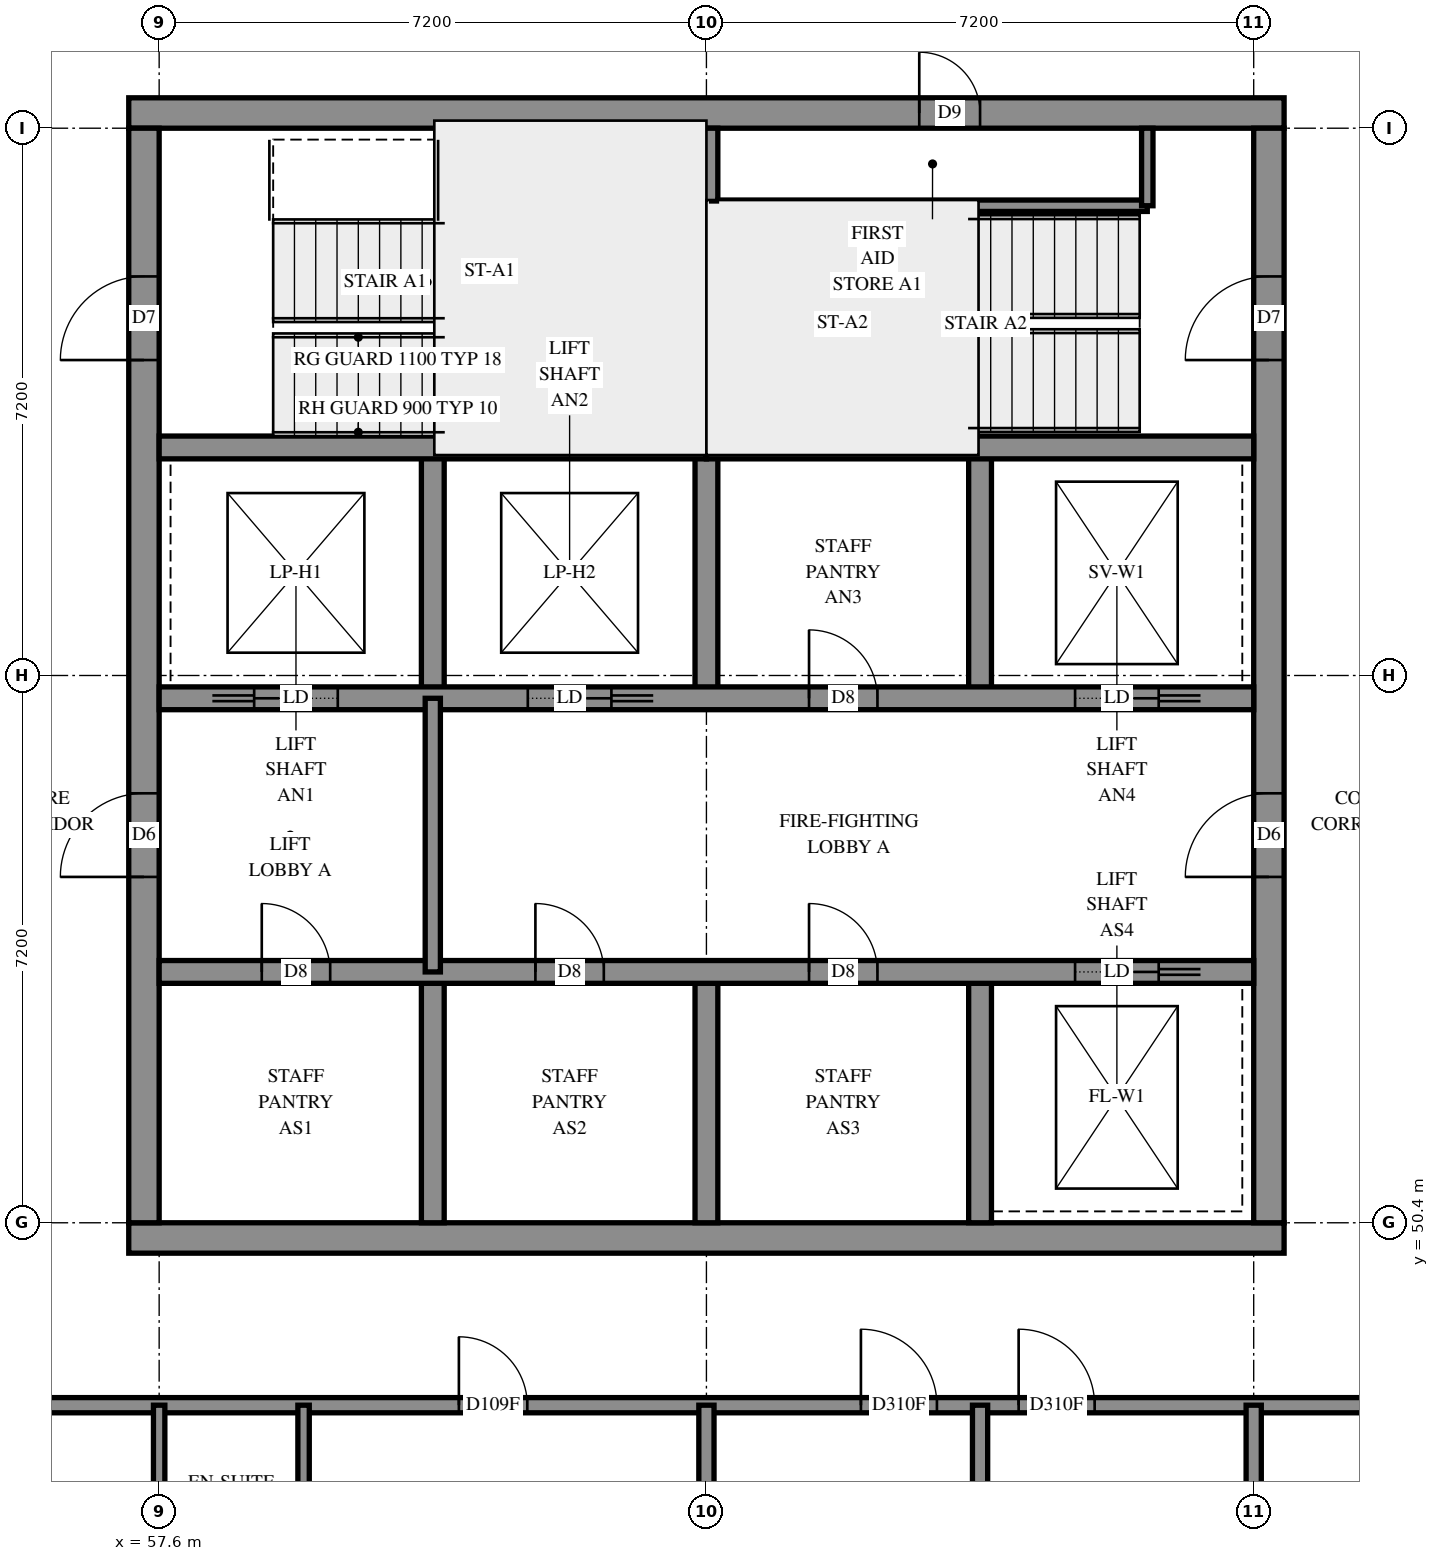
"""IFC4 building model, lengths in metres.
Left out: names, types, materials, properties, quantities, classifications, styles, units other than length and angle.
Written with IfcOpenShell. Run it as: python <this file> out.ifc"""

import sys

from ifc_helpers import new_model, si_unit, direction, frame, frame_2d, origin, place, context, subcontext, project, spatial, rectangle, extrude, element, fill, save


model = new_model("IFC4")
c1 = context("Model", 3, precision=1e-05, world=origin(), true_north=direction((0.0, 1.0)))
c2 = subcontext(c1, "Body", "Model", "MODEL_VIEW")
j1 = project(units=[si_unit("LENGTHUNIT", "METRE"), si_unit("PLANEANGLEUNIT", "RADIAN")], contexts=[c1])
p1 = place(None, origin())
s1 = spatial("IfcSite", under=j1, at=p1, CompositionType="ELEMENT")
p2 = place(p1, origin())
s2 = spatial("IfcBuilding", under=s1, at=p2, CompositionType="ELEMENT")
p3 = place(p2, frame((0.0, 0.0, 257.4)))
s3 = spatial("IfcBuildingStorey", under=s2, at=p3, CompositionType="ELEMENT", Elevation=257.4)
p4 = place(p3, frame((57.2, 50.2, -0.3), z_axis=(0.0, 0.0, 1.0), x_axis=(1.0, 0.0, 0.0)))
e1 = element("IfcWall", 1, at=p4, inside=s3, PredefinedType="SHEAR", context=c2, shape_type="SweptSolid", body=[
    extrude(rectangle(XDim=15.2, YDim=0.4, at=frame_2d((7.6, 0.0))), origin(), (0.0, 0.0, 1.0), 2.7),
])
p5 = place(p3, frame((57.2, 65.0, -0.3), z_axis=(0.0, 0.0, 1.0), x_axis=(1.0, 0.0, 0.0)))
e2 = element("IfcWall", 2, at=p5, inside=s3, PredefinedType="SHEAR", context=c2, shape_type="SweptSolid", body=[
    extrude(rectangle(XDim=15.2, YDim=0.4, at=frame_2d((7.6, 0.0))), origin(), (0.0, 0.0, 1.0), 2.7),
])
p6 = place(p5, frame((10.4, 0.0, 0.3)))
e3 = element("IfcOpeningElement", 3, at=p6, cuts=e2, PredefinedType="OPENING", context=c2, shape_type="SweptSolid", body=[
    extrude(rectangle(XDim=0.8, YDim=2.1, at=frame_2d((0.4, 1.05))), frame((0.0, 0.21, 0.0), z_axis=(0.0, -1.0, 0.0), x_axis=(1.0, 0.0, 0.0)), (0.0, 0.0, 1.0), 0.42),
])
p7 = place(p3, frame((57.4, 50.4, -0.3), z_axis=(0.0, 0.0, 1.0), x_axis=(0.0, 1.0, 0.0)))
e4 = element("IfcWall", 4, at=p7, inside=s3, PredefinedType="SHEAR", context=c2, shape_type="SweptSolid", body=[
    extrude(rectangle(XDim=14.4, YDim=0.4, at=frame_2d((7.2, 0.0))), origin(), (0.0, 0.0, 1.0), 2.7),
])
p8 = place(p7, frame((4.55, 0.0, 0.3)))
e5 = element("IfcOpeningElement", 5, at=p8, cuts=e4, PredefinedType="OPENING", context=c2, shape_type="SweptSolid", body=[
    extrude(rectangle(XDim=1.1, YDim=2.1, at=frame_2d((0.55, 1.05))), frame((0.0, 0.21, 0.0), z_axis=(0.0, -1.0, 0.0), x_axis=(1.0, 0.0, 0.0)), (0.0, 0.0, 1.0), 0.42),
])
p9 = place(p7, frame((11.35, 0.0, 0.3)))
e6 = element("IfcOpeningElement", 6, at=p9, cuts=e4, PredefinedType="OPENING", context=c2, shape_type="SweptSolid", body=[
    extrude(rectangle(XDim=1.1, YDim=2.1, at=frame_2d((0.55, 1.05))), frame((0.0, 0.21, 0.0), z_axis=(0.0, -1.0, 0.0), x_axis=(1.0, 0.0, 0.0)), (0.0, 0.0, 1.0), 0.42),
])
p10 = place(p3, frame((72.2, 50.4, -0.3), z_axis=(0.0, 0.0, 1.0), x_axis=(0.0, 1.0, 0.0)))
e7 = element("IfcWall", 7, at=p10, inside=s3, PredefinedType="SHEAR", context=c2, shape_type="SweptSolid", body=[
    extrude(rectangle(XDim=14.4, YDim=0.4, at=frame_2d((7.2, 0.0))), origin(), (0.0, 0.0, 1.0), 2.7),
])
p11 = place(p10, frame((4.55, 0.0, 0.3)))
e8 = element("IfcOpeningElement", 8, at=p11, cuts=e7, PredefinedType="OPENING", context=c2, shape_type="SweptSolid", body=[
    extrude(rectangle(XDim=1.1, YDim=2.1, at=frame_2d((0.55, 1.05))), frame((0.0, 0.21, 0.0), z_axis=(0.0, -1.0, 0.0), x_axis=(1.0, 0.0, 0.0)), (0.0, 0.0, 1.0), 0.42),
])
p12 = place(p10, frame((11.35, 0.0, 0.3)))
e9 = element("IfcOpeningElement", 9, at=p12, cuts=e7, PredefinedType="OPENING", context=c2, shape_type="SweptSolid", body=[
    extrude(rectangle(XDim=1.1, YDim=2.1, at=frame_2d((0.55, 1.05))), frame((0.0, 0.21, 0.0), z_axis=(0.0, -1.0, 0.0), x_axis=(1.0, 0.0, 0.0)), (0.0, 0.0, 1.0), 0.42),
])
for number, where, z_axis, x_axis in (
    (10, (61.2, 50.4, 0.0), (0.0, 0.0, 1.0), (0.0, 1.0, 0.0)),
    (11, (61.2, 57.3, 0.0), (0.0, 0.0, 1.0), (0.0, 1.0, 0.0)),
    (12, (64.8, 50.4, 0.0), (0.0, 0.0, 1.0), (0.0, 1.0, 0.0)),
    (13, (64.8, 57.3, 0.0), (0.0, 0.0, 1.0), (0.0, 1.0, 0.0)),
    (14, (68.4, 50.4, 0.0), (0.0, 0.0, 1.0), (0.0, 1.0, 0.0)),
    (15, (68.4, 57.3, 0.0), (0.0, 0.0, 1.0), (0.0, 1.0, 0.0)),
):
    element("IfcWall", number, at=place(p3, frame(where, z_axis=z_axis, x_axis=x_axis)), inside=s3, PredefinedType="SOLIDWALL", context=c2, shape_type="SweptSolid", body=[
        extrude(rectangle(XDim=3.3, YDim=0.3, at=frame_2d((1.65, 0.0))), origin(), (0.0, 0.0, 1.0), 3.1),
    ])
p13 = place(p3, frame((57.6, 53.7, 0.0), z_axis=(0.0, 0.0, 1.0), x_axis=(1.0, 0.0, 0.0)))
e16 = element("IfcWall", 16, at=p13, inside=s3, PredefinedType="SOLIDWALL", context=c2, shape_type="SweptSolid", body=[
    extrude(rectangle(XDim=14.4, YDim=0.3, at=frame_2d((7.2, 0.0))), origin(), (0.0, 0.0, 1.0), 3.1),
])
p14 = place(p13, frame((1.35, 0.0, 0.0)))
e17 = element("IfcOpeningElement", 17, at=p14, cuts=e16, PredefinedType="OPENING", context=c2, shape_type="SweptSolid", body=[
    extrude(rectangle(XDim=0.9, YDim=2.1, at=frame_2d((0.45, 1.05))), frame((0.0, 0.16, 0.0), z_axis=(0.0, -1.0, 0.0), x_axis=(1.0, 0.0, 0.0)), (0.0, 0.0, 1.0), 0.32),
])
p15 = place(p13, frame((4.95, 0.0, 0.0)))
e18 = element("IfcOpeningElement", 18, at=p15, cuts=e16, PredefinedType="OPENING", context=c2, shape_type="SweptSolid", body=[
    extrude(rectangle(XDim=0.9, YDim=2.1, at=frame_2d((0.45, 1.05))), frame((0.0, 0.16, 0.0), z_axis=(0.0, -1.0, 0.0), x_axis=(1.0, 0.0, 0.0)), (0.0, 0.0, 1.0), 0.32),
])
p16 = place(p13, frame((8.55, 0.0, 0.0)))
e19 = element("IfcOpeningElement", 19, at=p16, cuts=e16, PredefinedType="OPENING", context=c2, shape_type="SweptSolid", body=[
    extrude(rectangle(XDim=0.9, YDim=2.1, at=frame_2d((0.45, 1.05))), frame((0.0, 0.16, 0.0), z_axis=(0.0, -1.0, 0.0), x_axis=(1.0, 0.0, 0.0)), (0.0, 0.0, 1.0), 0.32),
])
p17 = place(p13, frame((12.05, 0.0, 0.0)))
e20 = element("IfcOpeningElement", 20, at=p17, cuts=e16, PredefinedType="OPENING", context=c2, shape_type="SweptSolid", body=[
    extrude(rectangle(XDim=1.1, YDim=2.1, at=frame_2d((0.55, 1.05))), frame((0.0, 0.16, 0.0), z_axis=(0.0, -1.0, 0.0), x_axis=(1.0, 0.0, 0.0)), (0.0, 0.0, 1.0), 0.32),
])
p18 = place(p3, frame((57.6, 57.3, 0.0), z_axis=(0.0, 0.0, 1.0), x_axis=(1.0, 0.0, 0.0)))
e21 = element("IfcWall", 21, at=p18, inside=s3, PredefinedType="SOLIDWALL", context=c2, shape_type="SweptSolid", body=[
    extrude(rectangle(XDim=14.4, YDim=0.3, at=frame_2d((7.2, 0.0))), origin(), (0.0, 0.0, 1.0), 3.1),
])
p19 = place(p18, frame((8.55, 0.0, 0.0)))
e22 = element("IfcOpeningElement", 22, at=p19, cuts=e21, PredefinedType="OPENING", context=c2, shape_type="SweptSolid", body=[
    extrude(rectangle(XDim=0.9, YDim=2.1, at=frame_2d((0.45, 1.05))), frame((0.0, 0.16, 0.0), z_axis=(0.0, -1.0, 0.0), x_axis=(1.0, 0.0, 0.0)), (0.0, 0.0, 1.0), 0.32),
])
p20 = place(p18, frame((1.25, 0.0, 0.0)))
e23 = element("IfcOpeningElement", 23, at=p20, cuts=e21, PredefinedType="OPENING", context=c2, shape_type="SweptSolid", body=[
    extrude(rectangle(XDim=1.1, YDim=2.1, at=frame_2d((0.55, 1.05))), frame((0.0, 0.16, 0.0), z_axis=(0.0, -1.0, 0.0), x_axis=(1.0, 0.0, 0.0)), (0.0, 0.0, 1.0), 0.32),
])
p21 = place(p18, frame((4.85, 0.0, 0.0)))
e24 = element("IfcOpeningElement", 24, at=p21, cuts=e21, PredefinedType="OPENING", context=c2, shape_type="SweptSolid", body=[
    extrude(rectangle(XDim=1.1, YDim=2.1, at=frame_2d((0.55, 1.05))), frame((0.0, 0.16, 0.0), z_axis=(0.0, -1.0, 0.0), x_axis=(1.0, 0.0, 0.0)), (0.0, 0.0, 1.0), 0.32),
])
p22 = place(p18, frame((12.05, 0.0, 0.0)))
e25 = element("IfcOpeningElement", 25, at=p22, cuts=e21, PredefinedType="OPENING", context=c2, shape_type="SweptSolid", body=[
    extrude(rectangle(XDim=1.1, YDim=2.1, at=frame_2d((0.55, 1.05))), frame((0.0, 0.16, 0.0), z_axis=(0.0, -1.0, 0.0), x_axis=(1.0, 0.0, 0.0)), (0.0, 0.0, 1.0), 0.32),
])
for number, where, z_axis, x_axis in (
    (26, (57.6, 60.6, 0.0), (0.0, 0.0, 1.0), (1.0, 0.0, 0.0)),
    (27, (64.8, 60.6, 0.0), (0.0, 0.0, 1.0), (1.0, 0.0, 0.0)),
):
    element("IfcWall", number, at=place(p3, frame(where, z_axis=z_axis, x_axis=x_axis)), inside=s3, PredefinedType="SOLIDWALL", context=c2, shape_type="SweptSolid", body=[
        extrude(rectangle(XDim=7.2, YDim=0.3, at=frame_2d((3.6, 0.0))), origin(), (0.0, 0.0, 1.0), 3.1),
    ])
p23 = place(p3, frame((64.8, 60.6, 0.0), z_axis=(0.0, 0.0, 1.0), x_axis=(0.0, 1.0, 0.0)))
e28 = element("IfcWall", 28, at=p23, inside=s3, PredefinedType="SOLIDWALL", context=c2, shape_type="SweptSolid", body=[
    extrude(rectangle(XDim=4.2, YDim=0.3, at=frame_2d((2.1, 0.0))), origin(), (0.0, 0.0, 1.0), 3.1),
])
p24 = place(p3, frame((64.95, 63.78, 0.0), z_axis=(0.0, 0.0, 1.0), x_axis=(1.0, 0.0, 0.0)))
e29 = element("IfcWall", 29, at=p24, inside=s3, PredefinedType="PARTITIONING", context=c2, shape_type="SweptSolid", body=[
    extrude(rectangle(XDim=5.65, YDim=0.15, at=frame_2d((2.825, 0.0))), origin(), (0.0, 0.0, 1.0), 3.1),
])
p25 = place(p3, frame((70.6, 63.78, 0.0), z_axis=(0.0, 0.0, 1.0), x_axis=(0.0, 1.0, 0.0)))
e30 = element("IfcWall", 30, at=p25, inside=s3, PredefinedType="PARTITIONING", context=c2, shape_type="SweptSolid", body=[
    extrude(rectangle(XDim=1.02, YDim=0.15, at=frame_2d((0.51, 0.0))), origin(), (0.0, 0.0, 1.0), 3.1),
])
p26 = place(p3, frame((61.2, 53.7, 0.0), z_axis=(0.0, 0.0, 1.0), x_axis=(0.0, 1.0, 0.0)))
e31 = element("IfcWall", 31, at=p26, inside=s3, PredefinedType="PARTITIONING", context=c2, shape_type="SweptSolid", body=[
    extrude(rectangle(XDim=3.6, YDim=0.2, at=frame_2d((1.8, 0.0))), origin(), (0.0, 0.0, 1.0), 3.1),
])
p27 = place(p3, frame((55.2, 48.0, 0.0), z_axis=(0.0, 0.0, 1.0), x_axis=(1.0, 0.0, 0.0)))
e32 = element("IfcWall", 32, at=p27, inside=s3, PredefinedType="PARTITIONING", context=c2, shape_type="SweptSolid", body=[
    extrude(rectangle(XDim=19.15, YDim=0.2, at=frame_2d((9.575, 0.0))), origin(), (0.0, 0.0, 1.0), 3.1),
])
p28 = place(p27, frame((6.343, 0.0, 0.0)))
e33 = element("IfcOpeningElement", 33, at=p28, cuts=e32, PredefinedType="OPENING", context=c2, shape_type="SweptSolid", body=[
    extrude(rectangle(XDim=0.9, YDim=2.1, at=frame_2d((0.45, 1.05))), frame((0.0, 0.11, 0.0), z_axis=(0.0, -1.0, 0.0), x_axis=(1.0, 0.0, 0.0)), (0.0, 0.0, 1.0), 0.22),
])
p29 = place(p27, frame((11.633, 0.0, 0.0)))
e34 = element("IfcOpeningElement", 34, at=p29, cuts=e32, PredefinedType="OPENING", context=c2, shape_type="SweptSolid", body=[
    extrude(rectangle(XDim=1.0, YDim=2.1, at=frame_2d((0.5, 1.05))), frame((0.0, 0.11, 0.0), z_axis=(0.0, -1.0, 0.0), x_axis=(1.0, 0.0, 0.0)), (0.0, 0.0, 1.0), 0.22),
])
p30 = place(p27, frame((13.707, 0.0, 0.0)))
e35 = element("IfcOpeningElement", 35, at=p30, cuts=e32, PredefinedType="OPENING", context=c2, shape_type="SweptSolid", body=[
    extrude(rectangle(XDim=1.0, YDim=2.1, at=frame_2d((0.5, 1.05))), frame((0.0, 0.11, 0.0), z_axis=(0.0, -1.0, 0.0), x_axis=(1.0, 0.0, 0.0)), (0.0, 0.0, 1.0), 0.22),
])
p31 = place(p3, frame((68.4, 42.311, 0.0), z_axis=(0.0, 0.0, 1.0), x_axis=(0.0, 1.0, 0.0)))
e36 = element("IfcWall", 36, at=p31, inside=s3, PredefinedType="PARTITIONING", context=c2, shape_type="SweptSolid", body=[
    extrude(rectangle(XDim=5.689, YDim=0.2, at=frame_2d((2.845, 0.0))), origin(), (0.0, 0.0, 1.0), 3.1),
])
for number, where, z_axis, x_axis in (
    (37, (64.8, 43.55, 0.0), (0.0, 0.0, 1.0), (0.0, 1.0, 0.0)),
    (38, (72.0, 43.55, 0.0), (0.0, 0.0, 1.0), (0.0, 1.0, 0.0)),
):
    element("IfcWall", number, at=place(p3, frame(where, z_axis=z_axis, x_axis=x_axis)), inside=s3, PredefinedType="PARTITIONING", context=c2, shape_type="SweptSolid", body=[
        extrude(rectangle(XDim=4.45, YDim=0.2, at=frame_2d((2.225, 0.0))), origin(), (0.0, 0.0, 1.0), 3.1),
    ])
for number, where, z_axis, x_axis in (
    (39, (59.5, 45.6, 0.0), (0.0, 0.0, 1.0), (0.0, 1.0, 0.0)),
    (40, (57.6, 45.6, 0.0), (0.0, 0.0, 1.0), (0.0, 1.0, 0.0)),
):
    element("IfcWall", number, at=place(p3, frame(where, z_axis=z_axis, x_axis=x_axis)), inside=s3, PredefinedType="PARTITIONING", context=c2, shape_type="SweptSolid", body=[
        extrude(rectangle(XDim=2.4, YDim=0.15, at=frame_2d((1.2, 0.0))), origin(), (0.0, 0.0, 1.0), 3.1),
    ])
p32 = place(p6, origin())
e41 = element("IfcDoor", 41, at=p32, inside=s3, OperationType="SINGLE_SWING_RIGHT", PredefinedType="DOOR", context=c2, shape_type="SweptSolid", body=[
    extrude(rectangle(XDim=0.8, YDim=2.1, at=frame_2d((0.4, 1.05))), frame((0.0, 0.025, 0.0), z_axis=(0.0, -1.0, 0.0), x_axis=(1.0, 0.0, 0.0)), (0.0, 0.0, 1.0), 0.05),
])
fill(e3, e41)
p33 = place(p8, origin())
e42 = element("IfcDoor", 42, at=p33, inside=s3, OperationType="DOUBLE_DOOR_SINGLE_SWING", PredefinedType="DOOR", context=c2, shape_type="SweptSolid", body=[
    extrude(rectangle(XDim=1.1, YDim=2.1, at=frame_2d((0.55, 1.05))), frame((0.0, 0.025, 0.0), z_axis=(0.0, -1.0, 0.0), x_axis=(1.0, 0.0, 0.0)), (0.0, 0.0, 1.0), 0.05),
])
fill(e5, e42)
p34 = place(p11, origin())
e43 = element("IfcDoor", 43, at=p34, inside=s3, OperationType="DOUBLE_DOOR_SINGLE_SWING", PredefinedType="DOOR", context=c2, shape_type="SweptSolid", body=[
    extrude(rectangle(XDim=1.1, YDim=2.1, at=frame_2d((0.55, 1.05))), frame((0.0, 0.025, 0.0), z_axis=(0.0, -1.0, 0.0), x_axis=(1.0, 0.0, 0.0)), (0.0, 0.0, 1.0), 0.05),
])
fill(e8, e43)
p35 = place(p9, origin())
e44 = element("IfcDoor", 44, at=p35, inside=s3, OperationType="SINGLE_SWING_LEFT", PredefinedType="DOOR", context=c2, shape_type="SweptSolid", body=[
    extrude(rectangle(XDim=1.1, YDim=2.1, at=frame_2d((0.55, 1.05))), frame((0.0, 0.025, 0.0), z_axis=(0.0, -1.0, 0.0), x_axis=(1.0, 0.0, 0.0)), (0.0, 0.0, 1.0), 0.05),
])
fill(e6, e44)
p36 = place(p12, origin())
e45 = element("IfcDoor", 45, at=p36, inside=s3, OperationType="SINGLE_SWING_RIGHT", PredefinedType="DOOR", context=c2, shape_type="SweptSolid", body=[
    extrude(rectangle(XDim=1.1, YDim=2.1, at=frame_2d((0.55, 1.05))), frame((0.0, 0.025, 0.0), z_axis=(0.0, -1.0, 0.0), x_axis=(1.0, 0.0, 0.0)), (0.0, 0.0, 1.0), 0.05),
])
fill(e9, e45)
p37 = place(p14, origin())
e46 = element("IfcDoor", 46, at=p37, inside=s3, OperationType="SINGLE_SWING_LEFT", PredefinedType="DOOR", context=c2, shape_type="SweptSolid", body=[
    extrude(rectangle(XDim=0.9, YDim=2.1, at=frame_2d((0.45, 1.05))), frame((0.0, 0.025, 0.0), z_axis=(0.0, -1.0, 0.0), x_axis=(1.0, 0.0, 0.0)), (0.0, 0.0, 1.0), 0.05),
])
fill(e17, e46)
p38 = place(p15, origin())
e47 = element("IfcDoor", 47, at=p38, inside=s3, OperationType="SINGLE_SWING_LEFT", PredefinedType="DOOR", context=c2, shape_type="SweptSolid", body=[
    extrude(rectangle(XDim=0.9, YDim=2.1, at=frame_2d((0.45, 1.05))), frame((0.0, 0.025, 0.0), z_axis=(0.0, -1.0, 0.0), x_axis=(1.0, 0.0, 0.0)), (0.0, 0.0, 1.0), 0.05),
])
fill(e18, e47)
p39 = place(p16, origin())
e48 = element("IfcDoor", 48, at=p39, inside=s3, OperationType="SINGLE_SWING_LEFT", PredefinedType="DOOR", context=c2, shape_type="SweptSolid", body=[
    extrude(rectangle(XDim=0.9, YDim=2.1, at=frame_2d((0.45, 1.05))), frame((0.0, 0.025, 0.0), z_axis=(0.0, -1.0, 0.0), x_axis=(1.0, 0.0, 0.0)), (0.0, 0.0, 1.0), 0.05),
])
fill(e19, e48)
p40 = place(p19, origin())
e49 = element("IfcDoor", 49, at=p40, inside=s3, OperationType="SINGLE_SWING_LEFT", PredefinedType="DOOR", context=c2, shape_type="SweptSolid", body=[
    extrude(rectangle(XDim=0.9, YDim=2.1, at=frame_2d((0.45, 1.05))), frame((0.0, 0.025, 0.0), z_axis=(0.0, -1.0, 0.0), x_axis=(1.0, 0.0, 0.0)), (0.0, 0.0, 1.0), 0.05),
])
fill(e22, e49)
p41 = place(p17, origin())
e50 = element("IfcDoor", 50, at=p41, inside=s3, OperationType="SLIDING_TO_RIGHT", PredefinedType="DOOR", context=c2, shape_type="SweptSolid", body=[
    extrude(rectangle(XDim=1.1, YDim=2.1, at=frame_2d((0.55, 1.05))), frame((0.0, 0.025, 0.0), z_axis=(0.0, -1.0, 0.0), x_axis=(1.0, 0.0, 0.0)), (0.0, 0.0, 1.0), 0.05),
])
fill(e20, e50)
p42 = place(p20, origin())
e51 = element("IfcDoor", 51, at=p42, inside=s3, OperationType="SLIDING_TO_LEFT", PredefinedType="DOOR", context=c2, shape_type="SweptSolid", body=[
    extrude(rectangle(XDim=1.1, YDim=2.1, at=frame_2d((0.55, 1.05))), frame((0.0, 0.025, 0.0), z_axis=(0.0, -1.0, 0.0), x_axis=(1.0, 0.0, 0.0)), (0.0, 0.0, 1.0), 0.05),
])
fill(e23, e51)
p43 = place(p21, origin())
e52 = element("IfcDoor", 52, at=p43, inside=s3, OperationType="SLIDING_TO_RIGHT", PredefinedType="DOOR", context=c2, shape_type="SweptSolid", body=[
    extrude(rectangle(XDim=1.1, YDim=2.1, at=frame_2d((0.55, 1.05))), frame((0.0, 0.025, 0.0), z_axis=(0.0, -1.0, 0.0), x_axis=(1.0, 0.0, 0.0)), (0.0, 0.0, 1.0), 0.05),
])
fill(e24, e52)
p44 = place(p22, origin())
e53 = element("IfcDoor", 53, at=p44, inside=s3, OperationType="SLIDING_TO_RIGHT", PredefinedType="DOOR", context=c2, shape_type="SweptSolid", body=[
    extrude(rectangle(XDim=1.1, YDim=2.1, at=frame_2d((0.55, 1.05))), frame((0.0, 0.025, 0.0), z_axis=(0.0, -1.0, 0.0), x_axis=(1.0, 0.0, 0.0)), (0.0, 0.0, 1.0), 0.05),
])
fill(e25, e53)
p45 = place(p28, origin())
e54 = element("IfcDoor", 54, at=p45, inside=s3, OperationType="SINGLE_SWING_LEFT", PredefinedType="DOOR", context=c2, shape_type="SweptSolid", body=[
    extrude(rectangle(XDim=0.9, YDim=2.1, at=frame_2d((0.45, 1.05))), frame((0.0, 0.025, 0.0), z_axis=(0.0, -1.0, 0.0), x_axis=(1.0, 0.0, 0.0)), (0.0, 0.0, 1.0), 0.05),
])
fill(e33, e54)
p46 = place(p29, origin())
e55 = element("IfcDoor", 55, at=p46, inside=s3, OperationType="SINGLE_SWING_LEFT", PredefinedType="DOOR", context=c2, shape_type="SweptSolid", body=[
    extrude(rectangle(XDim=1.0, YDim=2.1, at=frame_2d((0.5, 1.05))), frame((0.0, 0.025, 0.0), z_axis=(0.0, -1.0, 0.0), x_axis=(1.0, 0.0, 0.0)), (0.0, 0.0, 1.0), 0.05),
])
fill(e34, e55)
p47 = place(p30, origin())
e56 = element("IfcDoor", 56, at=p47, inside=s3, OperationType="SINGLE_SWING_RIGHT", PredefinedType="DOOR", context=c2, shape_type="SweptSolid", body=[
    extrude(rectangle(XDim=1.0, YDim=2.1, at=frame_2d((0.5, 1.05))), frame((0.0, 0.025, 0.0), z_axis=(0.0, -1.0, 0.0), x_axis=(1.0, 0.0, 0.0)), (0.0, 0.0, 1.0), 0.05),
])
fill(e35, e56)
save(model, sys.argv[1])
